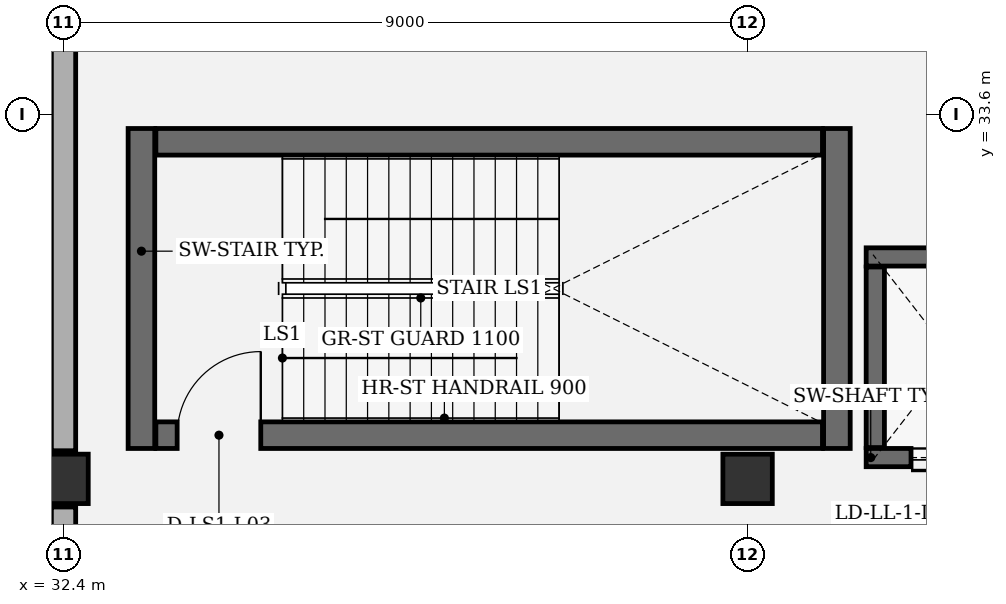
"""IFC4 building model, lengths in metres.
Left out: names, types, materials, properties, quantities, classifications, styles, units other than length and angle.
Written with IfcOpenShell. Run it as: python <this file> out.ifc"""

import sys

from ifc_helpers import new_model, si_unit, direction, frame, frame_2d, origin, origin_2d, place, context, subcontext, project, spatial, rectangle, extrude, element, fill, save


model = new_model("IFC4")
c1 = context("Model", 3, precision=1e-05, world=origin(), true_north=direction((0.0, 1.0)))
c2 = subcontext(c1, "Body", "Model", "MODEL_VIEW")
j1 = project(units=[si_unit("LENGTHUNIT", "METRE"), si_unit("PLANEANGLEUNIT", "RADIAN")], contexts=[c1])
p1 = place(None, origin())
s1 = spatial("IfcSite", under=j1, at=p1, CompositionType="ELEMENT")
p2 = place(p1, origin())
s2 = spatial("IfcBuilding", under=s1, at=p2, CompositionType="ELEMENT")
p3 = place(p2, frame((0.0, 0.0, 17.0)))
s3 = spatial("IfcBuildingStorey", under=s2, at=p3, CompositionType="ELEMENT", Elevation=17.0)
for number, where, z_axis, x_axis in (
    (1, (32.4, 28.8, 0.0), (0.0, 0.0, 1.0), (1.0, 0.0, 0.0)),
    (2, (41.4, 28.8, 0.0), (0.0, 0.0, 1.0), (1.0, 0.0, 0.0)),
):
    element("IfcColumn", number, at=place(p3, frame(where, z_axis=z_axis, x_axis=x_axis)), inside=s3, PredefinedType="COLUMN", context=c2, shape_type="SweptSolid", body=[
        extrude(rectangle(XDim=0.65, YDim=0.65, at=origin_2d()), origin(), (0.0, 0.0, 1.0), 5.0),
    ])
p4 = place(p3, frame((32.4, 19.57, 0.0), z_axis=(0.0, 0.0, 1.0), x_axis=(0.0, 1.0, 0.0)))
e3 = element("IfcWall", 3, at=p4, inside=s3, PredefinedType="SOLIDWALL", context=c2, shape_type="SweptSolid", body=[
    extrude(rectangle(XDim=8.86, YDim=0.32, at=frame_2d((4.43, 0.0))), origin(), (0.0, 0.0, 1.0), 3.937),
])
p5 = place(p3, frame((32.4, 29.17, 0.0), z_axis=(0.0, 0.0, 1.0), x_axis=(0.0, 1.0, 0.0)))
e4 = element("IfcWall", 4, at=p5, inside=s3, PredefinedType="SOLIDWALL", context=c2, shape_type="SweptSolid", body=[
    extrude(rectangle(XDim=8.86, YDim=0.32, at=frame_2d((4.43, 0.0))), origin(), (0.0, 0.0, 1.0), 3.937),
])
for number, where, z_axis, x_axis in (
    (5, (33.425, 33.41, 0.0), (0.0, 0.0, 1.0), (0.0, -1.0, 0.0)),
    (6, (42.575, 29.2, 0.0), (0.0, 0.0, 1.0), (0.0, 1.0, 0.0)),
):
    element("IfcWall", number, at=place(p3, frame(where, z_axis=z_axis, x_axis=x_axis)), inside=s3, PredefinedType="SHEAR", context=c2, shape_type="SweptSolid", body=[
        extrude(rectangle(XDim=4.21, YDim=0.35, at=frame_2d((2.105, 0.0))), origin(), (0.0, 0.0, 1.0), 4.995),
    ])
p6 = place(p3, frame((33.615, 29.375, 0.0), z_axis=(0.0, 0.0, 1.0), x_axis=(1.0, 0.0, 0.0)))
e7 = element("IfcWall", 7, at=p6, inside=s3, PredefinedType="SHEAR", context=c2, shape_type="SweptSolid", body=[
    extrude(rectangle(XDim=8.77, YDim=0.35, at=frame_2d((4.385, 0.0))), origin(), (0.0, 0.0, 1.0), 4.995),
])
p7 = place(p6, frame((0.28, 0.0, 0.0)))
e8 = element("IfcOpeningElement", 8, at=p7, cuts=e7, PredefinedType="OPENING", context=c2, shape_type="SweptSolid", body=[
    extrude(rectangle(XDim=1.1, YDim=2.2, at=frame_2d((0.55, 1.1))), frame((0.0, 0.185, 0.0), z_axis=(0.0, -1.0, 0.0), x_axis=(1.0, 0.0, 0.0)), (0.0, 0.0, 1.0), 0.37),
])
p8 = place(p3, frame((42.385, 33.235, 0.0), z_axis=(0.0, 0.0, 1.0), x_axis=(-1.0, 0.0, 0.0)))
e9 = element("IfcWall", 9, at=p8, inside=s3, PredefinedType="SHEAR", context=c2, shape_type="SweptSolid", body=[
    extrude(rectangle(XDim=8.77, YDim=0.35, at=frame_2d((4.385, 0.0))), origin(), (0.0, 0.0, 1.0), 4.995),
])
p9 = place(p3, frame((45.24, 29.08, 0.0), z_axis=(0.0, 0.0, 1.0), x_axis=(-1.0, 0.0, 0.0)))
e10 = element("IfcWall", 10, at=p9, inside=s3, PredefinedType="SHEAR", context=c2, shape_type="SweptSolid", body=[
    extrude(rectangle(XDim=2.28, YDim=0.24, at=frame_2d((1.14, 0.0))), origin(), (0.0, 0.0, 1.0), 4.74),
])
p10 = place(p9, frame((0.59, 0.0, 0.0)))
e11 = element("IfcOpeningElement", 11, at=p10, cuts=e10, PredefinedType="OPENING", context=c2, shape_type="SweptSolid", body=[
    extrude(rectangle(XDim=1.1, YDim=2.2, at=frame_2d((0.55, 1.1))), frame((0.0, 0.13, 0.0), z_axis=(0.0, -1.0, 0.0), x_axis=(1.0, 0.0, 0.0)), (0.0, 0.0, 1.0), 0.26),
])
p11 = place(p3, frame((42.96, 31.72, 0.0), z_axis=(0.0, 0.0, 1.0), x_axis=(1.0, 0.0, 0.0)))
e12 = element("IfcWall", 12, at=p11, inside=s3, PredefinedType="SHEAR", context=c2, shape_type="SweptSolid", body=[
    extrude(rectangle(XDim=2.28, YDim=0.24, at=frame_2d((1.14, 0.0))), origin(), (0.0, 0.0, 1.0), 4.74),
])
p12 = place(p3, frame((43.08, 29.212, 0.0), z_axis=(0.0, 0.0, 1.0), x_axis=(0.0, 1.0, 0.0)))
e13 = element("IfcWall", 13, at=p12, inside=s3, PredefinedType="SHEAR", context=c2, shape_type="SweptSolid", body=[
    extrude(rectangle(XDim=2.376, YDim=0.24, at=frame_2d((1.188, 0.0))), origin(), (0.0, 0.0, 1.0), 4.74),
])
p13 = place(p7, origin())
e14 = element("IfcDoor", 14, at=p13, inside=s3, OperationType="SINGLE_SWING_RIGHT", PredefinedType="DOOR", context=c2, shape_type="SweptSolid", body=[
    extrude(rectangle(XDim=1.1, YDim=2.2, at=frame_2d((0.55, 1.1))), frame((0.0, 0.025, 0.0), z_axis=(0.0, -1.0, 0.0), x_axis=(1.0, 0.0, 0.0)), (0.0, 0.0, 1.0), 0.05),
])
fill(e8, e14)
p14 = place(p10, origin())
e15 = element("IfcDoor", 15, at=p14, inside=s3, OperationType="DOUBLE_DOOR_SLIDING", PredefinedType="DOOR", context=c2, shape_type="SweptSolid", body=[
    extrude(rectangle(XDim=1.1, YDim=2.2, at=frame_2d((0.55, 1.1))), frame((0.0, 0.025, 0.0), z_axis=(0.0, -1.0, 0.0), x_axis=(1.0, 0.0, 0.0)), (0.0, 0.0, 1.0), 0.05),
])
fill(e11, e15)
save(model, sys.argv[1])
